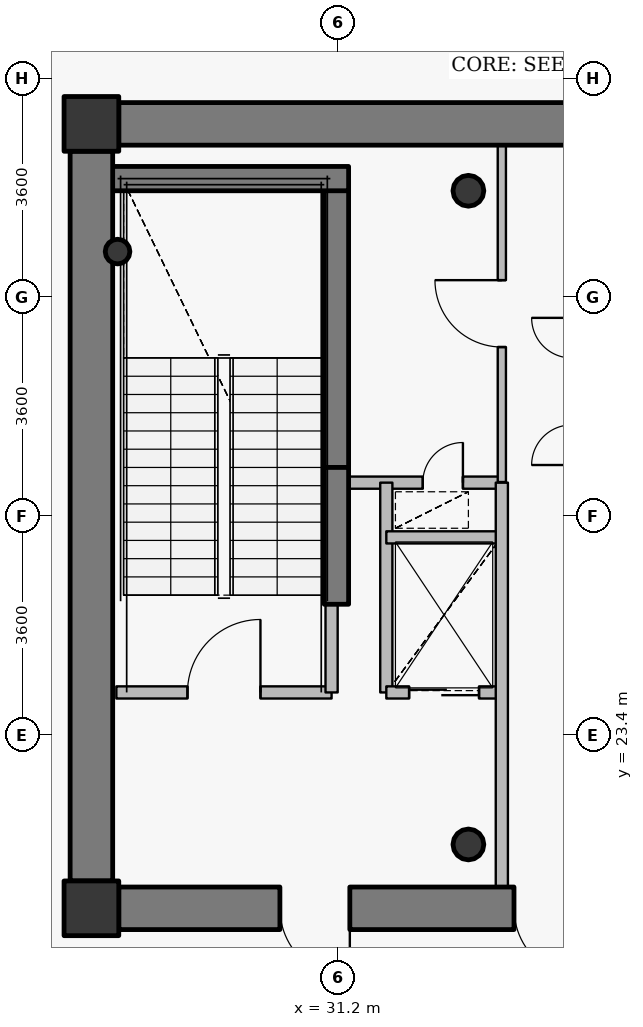
"""IFC4 building model, lengths in metres.
Left out: names, types, materials, properties, quantities, classifications, styles, units other than length and angle.
Written with IfcOpenShell. Run it as: python <this file> out.ifc"""

import sys

from ifc_helpers import new_model, si_unit, direction, frame, frame_2d, origin, origin_2d, place, context, subcontext, project, spatial, rectangle, hollow_circle, extrude, source, transform, mapped, element, fill, save


model = new_model("IFC4")
c1 = context("Model", 3, precision=1e-05, world=origin(), true_north=direction((0.0, 1.0)))
c2 = subcontext(c1, "Body", "Model", "MODEL_VIEW")
j1 = project(units=[si_unit("LENGTHUNIT", "METRE"), si_unit("PLANEANGLEUNIT", "RADIAN")], contexts=[c1])
p1 = place(None, origin())
s1 = spatial("IfcSite", under=j1, at=p1, CompositionType="ELEMENT")
p2 = place(p1, origin())
s2 = spatial("IfcBuilding", under=s1, at=p2, CompositionType="ELEMENT")
p3 = place(p2, frame((0.0, 0.0, 359.4)))
s3 = spatial("IfcBuildingStorey", under=s2, at=p3, CompositionType="ELEMENT", Elevation=359.4)
for number, where, z_axis, x_axis in (
    (1, (27.15, 20.55, 0.0), (0.0, 0.0, 1.0), (1.0, 0.0, 0.0)),
    (2, (27.15, 33.45, 0.0), (0.0, 0.0, 1.0), (1.0, 0.0, 0.0)),
):
    element("IfcColumn", number, at=place(p3, frame(where, z_axis=z_axis, x_axis=x_axis)), inside=s3, PredefinedType="COLUMN", context=c2, shape_type="SweptSolid", body=[
        extrude(rectangle(XDim=0.9, YDim=0.9, at=origin_2d()), origin(), (0.0, 0.0, 1.0), 4.2),
    ])
for number, where, z_axis, x_axis in (
    (3, (33.35, 21.6, 0.0), (0.0, 0.0, 1.0), (1.0, 0.0, 0.0)),
    (4, (33.35, 32.35, 0.0), (0.0, 0.0, 1.0), (1.0, 0.0, 0.0)),
):
    element("IfcColumn", number, at=place(p3, frame(where, z_axis=z_axis, x_axis=x_axis)), inside=s3, PredefinedType="COLUMN", context=c2, shape_type="SweptSolid", body=[
        extrude(hollow_circle(Radius=0.254, WallThickness=0.02, at=origin_2d()), origin(), (0.0, 0.0, 1.0), 4.2),
    ])
p4 = place(p3, frame((31.18, 27.8, 0.0), z_axis=(0.0, 0.0, 1.0), x_axis=(0.0, 1.0, 0.0)))
e5 = element("IfcWall", 5, at=p4, inside=s3, PredefinedType="SHEAR", context=c2, shape_type="SweptSolid", body=[
    extrude(rectangle(XDim=4.75, YDim=0.4, at=frame_2d((2.375, 0.0))), origin(), (0.0, 0.0, 1.0), 4.2),
])
p5 = place(p3, frame((27.25, 32.55, 0.0), z_axis=(0.0, 0.0, 1.0), x_axis=(1.0, 0.0, 0.0)))
e6 = element("IfcWall", 6, at=p5, inside=s3, PredefinedType="SHEAR", context=c2, shape_type="SweptSolid", body=[
    extrude(rectangle(XDim=4.13, YDim=0.4, at=frame_2d((2.065, 0.0))), origin(), (0.0, 0.0, 1.0), 4.2),
])
p6 = place(p3, frame((27.58, 31.35, 0.0), z_axis=(0.0, 0.0, 1.0), x_axis=(1.0, 0.0, 0.0)))
e7 = element("IfcColumn", 7, at=p6, inside=s3, PredefinedType="COLUMN", context=c2, shape_type="SweptSolid", body=[
    extrude(hollow_circle(Radius=0.203, WallThickness=0.016, at=origin_2d()), origin(), (0.0, 0.0, 1.0), 4.2),
])
p7 = place(p3, frame((27.6, 33.45, 0.0), z_axis=(0.0, 0.0, 1.0), x_axis=(1.0, 0.0, 0.0)))
e8 = element("IfcWall", 8, at=p7, inside=s3, PredefinedType="SHEAR", context=c2, shape_type="SweptSolid", body=[
    extrude(rectangle(XDim=16.8, YDim=0.7, at=frame_2d((8.4, 0.0))), origin(), (0.0, 0.0, 1.0), 3.45),
])
p8 = place(p7, frame((12.85, 0.0, 0.0)))
e9 = element("IfcOpeningElement", 9, at=p8, cuts=e8, PredefinedType="OPENING", context=c2, shape_type="SweptSolid", body=[
    extrude(rectangle(XDim=1.15, YDim=2.15, at=origin_2d()), frame((0.575, 0.36, 1.075), z_axis=(0.0, -1.0, 0.0), x_axis=(1.0, 0.0, 0.0)), (0.0, 0.0, 1.0), 0.72),
])
p9 = place(p3, frame((44.4, 20.55, 0.0), z_axis=(0.0, 0.0, 1.0), x_axis=(-1.0, 0.0, 0.0)))
e10 = element("IfcWall", 10, at=p9, inside=s3, PredefinedType="SHEAR", context=c2, shape_type="SweptSolid", body=[
    extrude(rectangle(XDim=16.8, YDim=0.7, at=frame_2d((8.4, 0.0))), origin(), (0.0, 0.0, 1.0), 3.45),
])
p10 = place(p9, frame((13.0, 0.0, 0.0)))
e11 = element("IfcOpeningElement", 11, at=p10, cuts=e10, PredefinedType="OPENING", context=c2, shape_type="SweptSolid", body=[
    extrude(rectangle(XDim=1.15, YDim=2.15, at=origin_2d()), frame((0.575, 0.36, 1.075), z_axis=(0.0, -1.0, 0.0), x_axis=(1.0, 0.0, 0.0)), (0.0, 0.0, 1.0), 0.72),
])
p11 = place(p9, frame((9.15, 0.0, 0.0)))
e12 = element("IfcOpeningElement", 12, at=p11, cuts=e10, PredefinedType="OPENING", context=c2, shape_type="SweptSolid", body=[
    extrude(rectangle(XDim=1.15, YDim=2.15, at=origin_2d()), frame((0.575, 0.36, 1.075), z_axis=(0.0, -1.0, 0.0), x_axis=(1.0, 0.0, 0.0)), (0.0, 0.0, 1.0), 0.72),
])
p12 = place(p3, frame((27.15, 21.0, 0.0), z_axis=(0.0, 0.0, 1.0), x_axis=(0.0, 1.0, 0.0)))
e13 = element("IfcWall", 13, at=p12, inside=s3, PredefinedType="SHEAR", context=c2, shape_type="SweptSolid", body=[
    extrude(rectangle(XDim=12.0, YDim=0.7, at=frame_2d((6.0, 0.0))), origin(), (0.0, 0.0, 1.0), 3.45),
])
p13 = place(p3, frame((31.18, 25.55, 0.0), z_axis=(0.0, 0.0, 1.0), x_axis=(0.0, 1.0, 0.0)))
e14 = element("IfcWall", 14, at=p13, inside=s3, PredefinedType="SHEAR", context=c2, shape_type="SweptSolid", body=[
    extrude(rectangle(XDim=2.25, YDim=0.4, at=frame_2d((1.125, 0.0))), origin(), (0.0, 0.0, 1.0), 3.5),
])
p14 = place(p3, frame((27.56, 24.1, 0.0), z_axis=(0.0, 0.0, 1.0), x_axis=(1.0, 0.0, 0.0)))
e15 = element("IfcWall", 15, at=p14, inside=s3, PredefinedType="PARTITIONING", context=c2, shape_type="SweptSolid", body=[
    extrude(rectangle(XDim=3.54, YDim=0.2, at=frame_2d((1.77, 0.0))), origin(), (0.0, 0.0, 1.0), 3.9),
])
p15 = place(p14, frame((1.17, 0.0, 0.0)))
e16 = element("IfcOpeningElement", 16, at=p15, cuts=e15, PredefinedType="OPENING", context=c2, shape_type="SweptSolid", body=[
    extrude(rectangle(XDim=1.2, YDim=2.15, at=origin_2d()), frame((0.6, 0.11, 1.075), z_axis=(0.0, -1.0, 0.0), x_axis=(1.0, 0.0, 0.0)), (0.0, 0.0, 1.0), 0.22),
])
p16 = place(p3, frame((31.1, 24.1, 0.0), z_axis=(0.0, 0.0, 1.0), x_axis=(0.0, 1.0, 0.0)))
e17 = element("IfcWall", 17, at=p16, inside=s3, PredefinedType="PARTITIONING", context=c2, shape_type="SweptSolid", body=[
    extrude(rectangle(XDim=1.44, YDim=0.2, at=frame_2d((0.72, 0.0))), origin(), (0.0, 0.0, 1.0), 3.9),
])
p17 = place(p3, frame((31.1, 27.55, 0.0), z_axis=(0.0, 0.0, 1.0), x_axis=(1.0, 0.0, 0.0)))
e18 = element("IfcWall", 18, at=p17, inside=s3, PredefinedType="PARTITIONING", context=c2, shape_type="SweptSolid", body=[
    extrude(rectangle(XDim=2.8, YDim=0.2, at=frame_2d((1.4, 0.0))), origin(), (0.0, 0.0, 1.0), 3.485),
])
p18 = place(p17, frame((1.5, 0.0, 0.0)))
e19 = element("IfcOpeningElement", 19, at=p18, cuts=e18, PredefinedType="OPENING", context=c2, shape_type="SweptSolid", body=[
    extrude(rectangle(XDim=0.66, YDim=2.05, at=origin_2d()), frame((0.33, 0.11, 1.025), z_axis=(0.0, -1.0, 0.0), x_axis=(1.0, 0.0, 0.0)), (0.0, 0.0, 1.0), 0.22),
])
p19 = place(p3, frame((32.0, 24.1, 0.0), z_axis=(0.0, 0.0, 1.0), x_axis=(0.0, 1.0, 0.0)))
e20 = element("IfcWall", 20, at=p19, inside=s3, PredefinedType="PARTITIONING", context=c2, shape_type="SweptSolid", body=[
    extrude(rectangle(XDim=3.45, YDim=0.2, at=frame_2d((1.725, 0.0))), origin(), (0.0, 0.0, 1.0), 3.9),
])
p20 = place(p3, frame((32.0, 24.1, 0.0), z_axis=(0.0, 0.0, 1.0), x_axis=(1.0, 0.0, 0.0)))
e21 = element("IfcWall", 21, at=p20, inside=s3, PredefinedType="PARTITIONING", context=c2, shape_type="SweptSolid", body=[
    extrude(rectangle(XDim=1.9, YDim=0.2, at=frame_2d((0.95, 0.0))), origin(), (0.0, 0.0, 1.0), 3.485),
])
p21 = place(p20, frame((0.375, 0.0, 0.0)))
e22 = element("IfcOpeningElement", 22, at=p21, cuts=e21, PredefinedType="OPENING", context=c2, shape_type="SweptSolid", body=[
    extrude(rectangle(XDim=1.15, YDim=2.15, at=origin_2d()), frame((0.575, 0.11, 1.075), z_axis=(0.0, -1.0, 0.0), x_axis=(1.0, 0.0, 0.0)), (0.0, 0.0, 1.0), 0.22),
])
p22 = place(p3, frame((32.0, 26.65, 0.0), z_axis=(0.0, 0.0, 1.0), x_axis=(1.0, 0.0, 0.0)))
e23 = element("IfcWall", 23, at=p22, inside=s3, PredefinedType="PARTITIONING", context=c2, shape_type="SweptSolid", body=[
    extrude(rectangle(XDim=1.9, YDim=0.2, at=frame_2d((0.95, 0.0))), origin(), (0.0, 0.0, 1.0), 3.485),
])
p23 = place(p3, frame((33.9, 20.9, 0.0), z_axis=(0.0, 0.0, 1.0), x_axis=(0.0, 1.0, 0.0)))
e24 = element("IfcWall", 24, at=p23, inside=s3, PredefinedType="PARTITIONING", context=c2, shape_type="SweptSolid", body=[
    extrude(rectangle(XDim=6.65, YDim=0.2, at=frame_2d((3.325, 0.0))), origin(), (0.0, 0.0, 1.0), 3.485),
])
p24 = place(p3, frame((33.9, 27.56, 0.0), z_axis=(0.0, 0.0, 1.0), x_axis=(0.0, 1.0, 0.0)))
e25 = element("IfcWall", 25, at=p24, inside=s3, PredefinedType="PARTITIONING", context=c2, shape_type="SweptSolid", body=[
    extrude(rectangle(XDim=5.54, YDim=0.135, at=frame_2d((2.77, 0.0))), origin(), (0.0, 0.0, 1.0), 3.485),
])
p25 = place(p24, frame((2.22, 0.0, 0.0)))
e26 = element("IfcOpeningElement", 26, at=p25, cuts=e25, PredefinedType="OPENING", context=c2, shape_type="SweptSolid", body=[
    extrude(rectangle(XDim=1.1, YDim=2.15, at=origin_2d()), frame((0.55, 0.078, 1.075), z_axis=(0.0, -1.0, 0.0), x_axis=(1.0, 0.0, 0.0)), (0.0, 0.0, 1.0), 0.155),
])
p26 = place(p3, frame((27.59, 33.8, 0.0), z_axis=(0.0, 0.0, 1.0), x_axis=(-1.0, 0.0, 0.0)))
e27 = element("IfcWall", 27, at=p26, inside=s3, PredefinedType="PARTITIONING", context=c2, shape_type="SweptSolid", body=[
    extrude(rectangle(XDim=0.79, YDim=0.135, at=frame_2d((0.395, 0.0))), origin(), (0.0, 0.0, 1.0), 2.685),
])
p27 = place(p3, frame((26.8, 33.492, 0.0), z_axis=(0.0, 0.0, 1.0), x_axis=(0.0, -1.0, 0.0)))
e28 = element("IfcWall", 28, at=p27, inside=s3, PredefinedType="PARTITIONING", context=c2, shape_type="SweptSolid", body=[
    extrude(rectangle(XDim=0.482, YDim=0.135, at=frame_2d((0.241, 0.0))), origin(), (0.0, 0.0, 1.0), 3.9),
])
p28 = place(p3, frame((26.8, 20.99, 0.0), z_axis=(0.0, 0.0, 1.0), x_axis=(0.0, -1.0, 0.0)))
e29 = element("IfcWall", 29, at=p28, inside=s3, PredefinedType="PARTITIONING", context=c2, shape_type="SweptSolid", body=[
    extrude(rectangle(XDim=0.79, YDim=0.135, at=frame_2d((0.395, 0.0))), origin(), (0.0, 0.0, 1.0), 2.685),
])
p29 = place(p3, frame((27.107, 20.2, 0.0), z_axis=(0.0, 0.0, 1.0), x_axis=(1.0, 0.0, 0.0)))
e30 = element("IfcWall", 30, at=p29, inside=s3, PredefinedType="PARTITIONING", context=c2, shape_type="SweptSolid", body=[
    extrude(rectangle(XDim=0.483, YDim=0.135, at=frame_2d((0.241, 0.0))), origin(), (0.0, 0.0, 1.0), 2.685),
])
m1 = source(origin(), c2, "Body", "SweptSolid", [
    extrude(rectangle(XDim=1.15, YDim=2.15, at=origin_2d()), frame((0.575, 0.025, 1.075), z_axis=(0.0, -1.0, 0.0), x_axis=(1.0, 0.0, 0.0)), (0.0, 0.0, 1.0), 0.05),
])
p30 = place(p10, origin())
e31 = element("IfcDoor", 31, at=p30, inside=s3, OperationType="SINGLE_SWING_LEFT", PredefinedType="DOOR", context=c2, shape_type="MappedRepresentation", body=[
    mapped(m1, transform((0.0, 0.0, 0.0), x_axis=(1.0, 0.0, 0.0), y_axis=(0.0, 1.0, 0.0), z_axis=(0.0, 0.0, 1.0), scale=1.0)),
])
fill(e11, e31)
p31 = place(p11, origin())
e32 = element("IfcDoor", 32, at=p31, inside=s3, OperationType="SINGLE_SWING_LEFT", PredefinedType="DOOR", context=c2, shape_type="MappedRepresentation", body=[
    mapped(m1, transform((0.0, 0.0, 0.0), x_axis=(1.0, 0.0, 0.0), y_axis=(0.0, 1.0, 0.0), z_axis=(0.0, 0.0, 1.0), scale=1.0)),
])
fill(e12, e32)
m2 = source(origin(), c2, "Body", "SweptSolid", [
    extrude(rectangle(XDim=1.2, YDim=2.15, at=origin_2d()), frame((0.6, 0.025, 1.075), z_axis=(0.0, -1.0, 0.0), x_axis=(1.0, 0.0, 0.0)), (0.0, 0.0, 1.0), 0.05),
])
p32 = place(p15, origin())
e33 = element("IfcDoor", 33, at=p32, inside=s3, OperationType="SINGLE_SWING_RIGHT", PredefinedType="DOOR", context=c2, shape_type="MappedRepresentation", body=[
    mapped(m2, transform((0.0, 0.0, 0.0), x_axis=(1.0, 0.0, 0.0), y_axis=(0.0, 1.0, 0.0), z_axis=(0.0, 0.0, 1.0), scale=1.0)),
])
fill(e16, e33)
m3 = source(origin(), c2, "Body", "SweptSolid", [
    extrude(rectangle(XDim=1.15, YDim=2.15, at=origin_2d()), frame((0.575, 0.025, 1.075), z_axis=(0.0, -1.0, 0.0), x_axis=(1.0, 0.0, 0.0)), (0.0, 0.0, 1.0), 0.05),
])
p33 = place(p21, origin())
e34 = element("IfcDoor", 34, at=p33, inside=s3, OperationType="DOUBLE_DOOR_SLIDING", PredefinedType="USERDEFINED", context=c2, shape_type="MappedRepresentation", body=[
    mapped(m3, transform((0.0, 0.0, 0.0), x_axis=(1.0, 0.0, 0.0), y_axis=(0.0, 1.0, 0.0), z_axis=(0.0, 0.0, 1.0), scale=1.0)),
])
fill(e22, e34)
m4 = source(origin(), c2, "Body", "SweptSolid", [
    extrude(rectangle(XDim=1.1, YDim=2.15, at=origin_2d()), frame((0.55, 0.025, 1.075), z_axis=(0.0, -1.0, 0.0), x_axis=(1.0, 0.0, 0.0)), (0.0, 0.0, 1.0), 0.05),
])
p34 = place(p25, origin())
e35 = element("IfcDoor", 35, at=p34, inside=s3, OperationType="SINGLE_SWING_RIGHT", PredefinedType="DOOR", context=c2, shape_type="MappedRepresentation", body=[
    mapped(m4, transform((0.0, 0.0, 0.0), x_axis=(1.0, 0.0, 0.0), y_axis=(0.0, 1.0, 0.0), z_axis=(0.0, 0.0, 1.0), scale=1.0)),
])
fill(e26, e35)
m5 = source(origin(), c2, "Body", "SweptSolid", [
    extrude(rectangle(XDim=0.66, YDim=2.05, at=origin_2d()), frame((0.33, 0.025, 1.025), z_axis=(0.0, -1.0, 0.0), x_axis=(1.0, 0.0, 0.0)), (0.0, 0.0, 1.0), 0.05),
])
p35 = place(p18, origin())
e36 = element("IfcDoor", 36, at=p35, inside=s3, OperationType="SINGLE_SWING_RIGHT", PredefinedType="USERDEFINED", context=c2, shape_type="MappedRepresentation", body=[
    mapped(m5, transform((0.0, 0.0, 0.0), x_axis=(1.0, 0.0, 0.0), y_axis=(0.0, 1.0, 0.0), z_axis=(0.0, 0.0, 1.0), scale=1.0)),
])
fill(e19, e36)
save(model, sys.argv[1])
